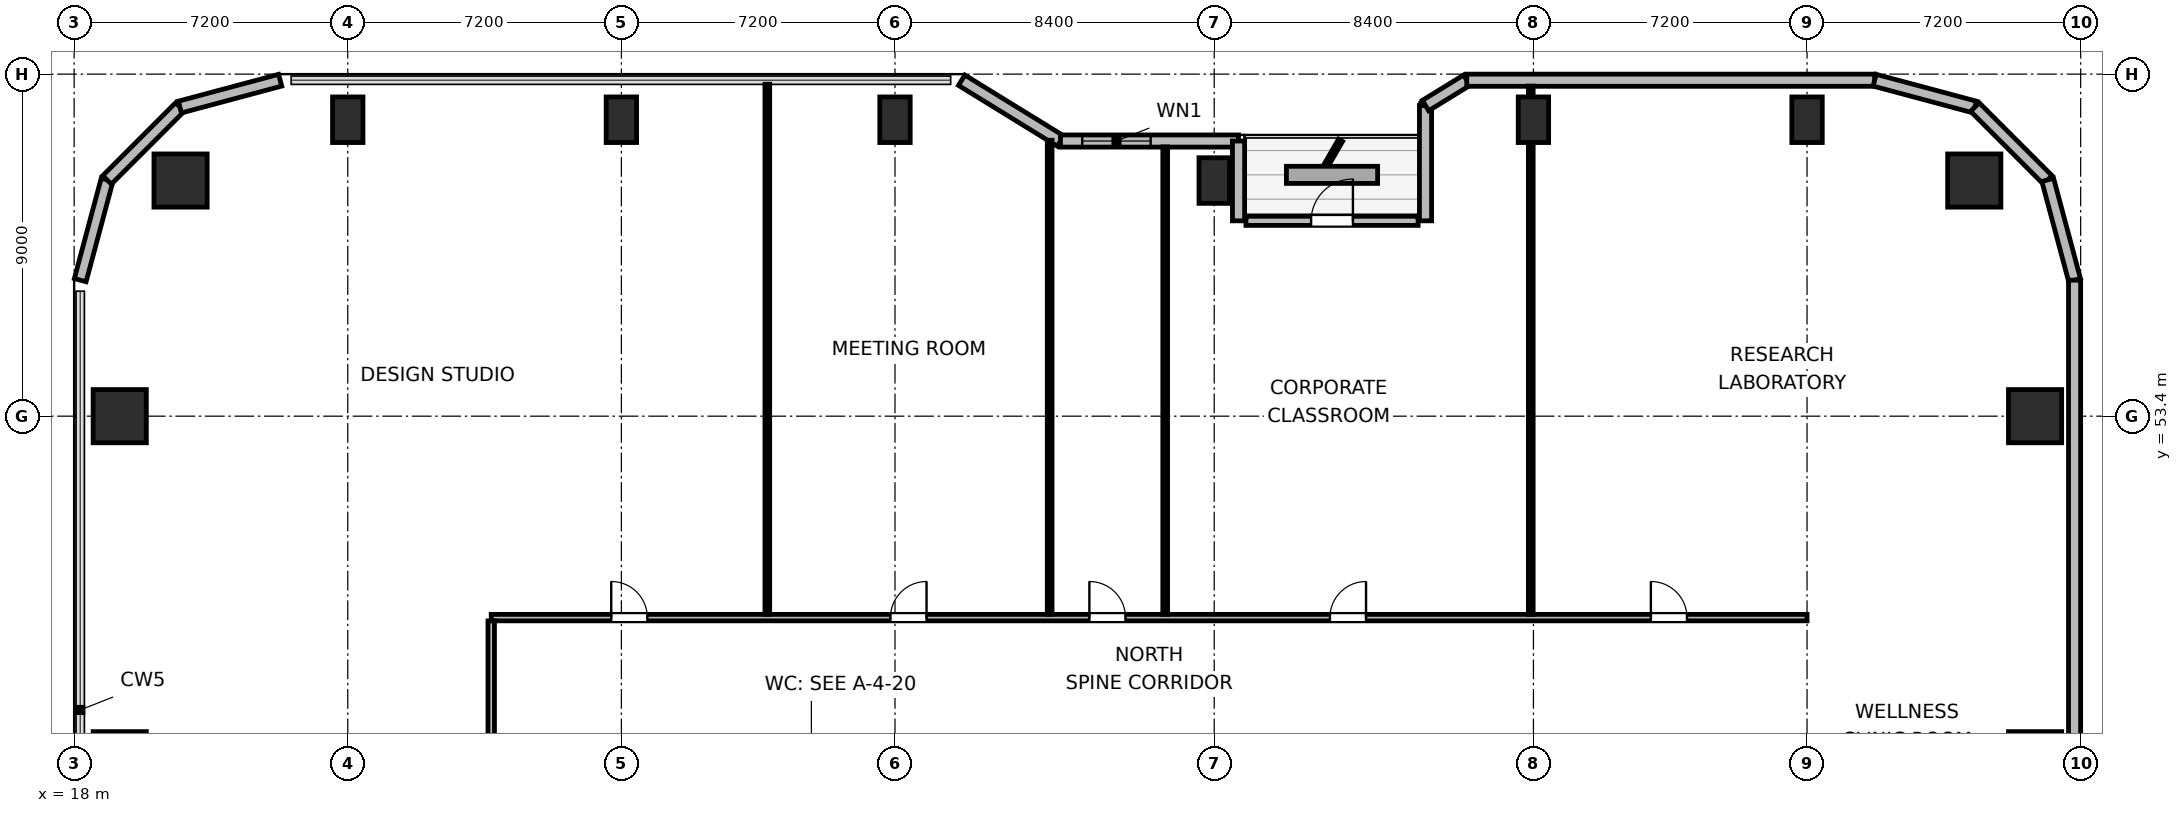
"""IFC4 building model, lengths in metres.
Left out: names, types, materials, properties, quantities, classifications, styles, units other than length and angle.
Written with IfcOpenShell. Run it as: python <this file> out.ifc"""

import sys

from ifc_helpers import new_model, si_unit, direction, frame, frame_2d, origin, origin_2d, place, context, subcontext, project, spatial, rectangle, circle, extrude, element, fill, save


model = new_model("IFC4")
c1 = context("Model", 3, precision=1e-05, world=origin(), true_north=direction((0.0, 1.0)))
c2 = subcontext(c1, "Body", "Model", "MODEL_VIEW")
j1 = project(units=[si_unit("LENGTHUNIT", "METRE"), si_unit("PLANEANGLEUNIT", "RADIAN")], contexts=[c1])
p1 = place(None, origin())
s1 = spatial("IfcSite", under=j1, at=p1, CompositionType="ELEMENT")
p2 = place(p1, origin())
s2 = spatial("IfcBuilding", under=s1, at=p2, CompositionType="ELEMENT")
p3 = place(p2, frame((0.0, 0.0, 125.4)))
s3 = spatial("IfcBuildingStorey", under=s2, at=p3, CompositionType="ELEMENT", Elevation=125.4)
for number, where, z_axis, x_axis in (
    (1, (68.0, 59.6, 0.0), (0.0, 0.0, 1.0), (1.0, 0.0, 0.0)),
    (2, (20.8, 59.6, 0.0), (0.0, 0.0, 1.0), (1.0, 0.0, 0.0)),
):
    element("IfcColumn", number, at=place(p3, frame(where, z_axis=z_axis, x_axis=x_axis)), inside=s3, PredefinedType="COLUMN", context=c2, shape_type="SweptSolid", body=[
        extrude(circle(Radius=0.7, at=origin_2d()), origin(), (0.0, 0.0, 1.0), 4.5),
    ])
for number, where, z_axis, x_axis in (
    (3, (25.2, 61.2, 0.0), (0.0, 0.0, 1.0), (1.0, 0.0, 0.0)),
    (4, (32.4, 61.2, 0.0), (0.0, 0.0, 1.0), (1.0, 0.0, 0.0)),
    (5, (39.6, 61.2, 0.0), (0.0, 0.0, 1.0), (1.0, 0.0, 0.0)),
    (6, (48.0, 59.6, 0.0), (0.0, 0.0, 1.0), (1.0, 0.0, 0.0)),
    (7, (56.4, 61.2, 0.0), (0.0, 0.0, 1.0), (1.0, 0.0, 0.0)),
    (8, (63.6, 61.2, 0.0), (0.0, 0.0, 1.0), (1.0, 0.0, 0.0)),
):
    element("IfcColumn", number, at=place(p3, frame(where, z_axis=z_axis, x_axis=x_axis)), inside=s3, PredefinedType="COLUMN", context=c2, shape_type="SweptSolid", body=[
        extrude(rectangle(XDim=0.8, YDim=1.2, at=origin_2d()), origin(), (0.0, 0.0, 1.0), 4.5),
    ])
for number, where, z_axis, x_axis in (
    (9, (19.2, 44.4, 0.0), (0.0, 0.0, 1.0), (1.0, 0.0, 0.0)),
    (10, (69.6, 44.4, 0.0), (0.0, 0.0, 1.0), (1.0, 0.0, 0.0)),
    (11, (19.2, 53.4, 0.0), (0.0, 0.0, 1.0), (1.0, 0.0, 0.0)),
    (12, (69.6, 53.4, 0.0), (0.0, 0.0, 1.0), (1.0, 0.0, 0.0)),
):
    element("IfcColumn", number, at=place(p3, frame(where, z_axis=z_axis, x_axis=x_axis)), inside=s3, PredefinedType="COLUMN", context=c2, shape_type="SweptSolid", body=[
        extrude(rectangle(XDim=1.4, YDim=1.4, at=origin_2d()), origin(), (0.0, 0.0, 1.0), 4.5),
    ])
p4 = place(p3, frame((18.16, 56.979, 0.0), z_axis=(0.0, 0.0, 1.0), x_axis=(0.25869736047, 0.965958423373, 0.0)))
e13 = element("IfcWall", 13, at=p4, inside=s3, PredefinedType="SOLIDWALL", context=c2, shape_type="SweptSolid", body=[
    extrude(rectangle(XDim=2.731, YDim=0.32, at=frame_2d((1.366, 0.0))), origin(), (0.0, 0.0, 1.0), 4.24),
])
p5 = place(p3, frame((18.866, 59.617, 0.0), z_axis=(0.0, 0.0, 1.0), x_axis=(0.707106781187, 0.707106781187, 0.0)))
e14 = element("IfcWall", 14, at=p5, inside=s3, PredefinedType="SOLIDWALL", context=c2, shape_type="SweptSolid", body=[
    extrude(rectangle(XDim=2.71, YDim=0.32, at=frame_2d((1.355, 0.0))), origin(), (0.0, 0.0, 1.0), 4.24),
])
p6 = place(p3, frame((20.783, 61.533, 0.0), z_axis=(0.0, 0.0, 1.0), x_axis=(0.965964405026, 0.25867502435, 0.0)))
e15 = element("IfcWall", 15, at=p6, inside=s3, PredefinedType="SOLIDWALL", context=c2, shape_type="SweptSolid", body=[
    extrude(rectangle(XDim=2.731, YDim=0.32, at=frame_2d((1.366, 0.0))), origin(), (0.0, 0.0, 1.0), 4.24),
])
p7 = place(p3, frame((41.355, 62.24, 0.0), z_axis=(0.0, 0.0, 1.0), x_axis=(0.851630857047, -0.524142044989, 0.0)))
e16 = element("IfcWall", 16, at=p7, inside=s3, PredefinedType="SOLIDWALL", context=c2, shape_type="SweptSolid", body=[
    extrude(rectangle(XDim=3.053, YDim=0.32, at=frame_2d((1.526, 0.0))), origin(), (0.0, 0.0, 1.0), 3.475),
])
p8 = place(p3, frame((43.955, 60.64, 0.0), z_axis=(0.0, 0.0, 1.0), x_axis=(1.0, 0.0, 0.0)))
e17 = element("IfcWall", 17, at=p8, inside=s3, PredefinedType="SOLIDWALL", context=c2, shape_type="SweptSolid", body=[
    extrude(rectangle(XDim=4.685, YDim=0.32, at=frame_2d((2.343, 0.0))), origin(), (0.0, 0.0, 1.0), 3.475),
])
p9 = place(p8, frame((0.573, 0.0, 0.85)))
e18 = element("IfcOpeningElement", 18, at=p9, cuts=e17, PredefinedType="OPENING", context=c2, shape_type="SweptSolid", body=[
    extrude(rectangle(XDim=1.8, YDim=1.1, at=frame_2d((0.9, 0.55))), frame((0.0, 0.17, 0.0), z_axis=(0.0, -1.0, 0.0), x_axis=(1.0, 0.0, 0.0)), (0.0, 0.0, 1.0), 0.34),
])
p10 = place(p3, frame((48.64, 60.64, 0.0), z_axis=(0.0, 0.0, 1.0), x_axis=(0.0, -1.0, 0.0)))
e19 = element("IfcWall", 19, at=p10, inside=s3, PredefinedType="SOLIDWALL", context=c2, shape_type="SweptSolid", body=[
    extrude(rectangle(XDim=2.1, YDim=0.32, at=frame_2d((1.05, 0.0))), origin(), (0.0, 0.0, 1.0), 3.475),
])
p11 = place(p3, frame((48.835, 58.54, 0.0), z_axis=(0.0, 0.0, 1.0), x_axis=(1.0, 0.0, 0.0)))
e20 = element("IfcWall", 20, at=p11, inside=s3, PredefinedType="SOLIDWALL", context=c2, shape_type="SweptSolid", body=[
    extrude(rectangle(XDim=4.53, YDim=0.24, at=frame_2d((2.265, 0.0))), origin(), (0.0, 0.0, 1.0), 4.24),
])
p12 = place(p11, frame((1.715, 0.0, 0.0)))
e21 = element("IfcOpeningElement", 21, at=p12, cuts=e20, PredefinedType="OPENING", context=c2, shape_type="SweptSolid", body=[
    extrude(rectangle(XDim=1.1, YDim=2.04, at=frame_2d((0.55, 1.02))), frame((0.0, 0.13, 0.0), z_axis=(0.0, -1.0, 0.0), x_axis=(1.0, 0.0, 0.0)), (0.0, 0.0, 1.0), 0.26),
])
p13 = place(p3, frame((53.56, 58.54, 0.0), z_axis=(0.0, 0.0, 1.0), x_axis=(0.0, 1.0, 0.0)))
e22 = element("IfcWall", 22, at=p13, inside=s3, PredefinedType="SOLIDWALL", context=c2, shape_type="SweptSolid", body=[
    extrude(rectangle(XDim=3.032, YDim=0.32, at=frame_2d((1.516, 0.0))), origin(), (0.0, 0.0, 1.0), 3.475),
])
p14 = place(p3, frame((53.56, 61.573, 0.0), z_axis=(0.0, 0.0, 1.0), x_axis=(0.851776724646, 0.523904964045, 0.0)))
e23 = element("IfcWall", 23, at=p14, inside=s3, PredefinedType="SOLIDWALL", context=c2, shape_type="SweptSolid", body=[
    extrude(rectangle(XDim=1.274, YDim=0.32, at=frame_2d((0.637, 0.0))), origin(), (0.0, 0.0, 1.0), 4.24),
])
p15 = place(p3, frame((54.645, 62.24, 0.0), z_axis=(0.0, 0.0, 1.0), x_axis=(1.0, 0.0, 0.0)))
e24 = element("IfcWall", 24, at=p15, inside=s3, PredefinedType="SOLIDWALL", context=c2, shape_type="SweptSolid", body=[
    extrude(rectangle(XDim=10.734, YDim=0.32, at=frame_2d((5.367, 0.0))), origin(), (0.0, 0.0, 1.0), 4.24),
])
p16 = place(p3, frame((65.379, 62.24, 0.0), z_axis=(0.0, 0.0, 1.0), x_axis=(0.965958423373, -0.25869736047, 0.0)))
e25 = element("IfcWall", 25, at=p16, inside=s3, PredefinedType="SOLIDWALL", context=c2, shape_type="SweptSolid", body=[
    extrude(rectangle(XDim=2.731, YDim=0.32, at=frame_2d((1.366, 0.0))), origin(), (0.0, 0.0, 1.0), 4.24),
])
p17 = place(p3, frame((68.017, 61.533, 0.0), z_axis=(0.0, 0.0, 1.0), x_axis=(0.707151821269, -0.707061738235, 0.0)))
e26 = element("IfcWall", 26, at=p17, inside=s3, PredefinedType="SOLIDWALL", context=c2, shape_type="SweptSolid", body=[
    extrude(rectangle(XDim=2.71, YDim=0.32, at=frame_2d((1.355, 0.0))), origin(), (0.0, 0.0, 1.0), 4.24),
])
p18 = place(p3, frame((69.934, 59.617, 0.0), z_axis=(0.0, 0.0, 1.0), x_axis=(0.258613949072, -0.965980758269, 0.0)))
e27 = element("IfcWall", 27, at=p18, inside=s3, PredefinedType="SOLIDWALL", context=c2, shape_type="SweptSolid", body=[
    extrude(rectangle(XDim=2.731, YDim=0.32, at=frame_2d((1.366, 0.0))), origin(), (0.0, 0.0, 1.0), 4.24),
])
p19 = place(p3, frame((70.64, 56.979, 0.0), z_axis=(0.0, 0.0, 1.0), x_axis=(0.0, -1.0, 0.0)))
e28 = element("IfcWall", 28, at=p19, inside=s3, PredefinedType="SOLIDWALL", context=c2, shape_type="SweptSolid", body=[
    extrude(rectangle(XDim=14.219, YDim=0.32, at=frame_2d((7.109, 0.0))), origin(), (0.0, 0.0, 1.0), 4.24),
])
p20 = place(p3, frame((28.975, 48.1, 0.0), z_axis=(0.0, 0.0, 1.0), x_axis=(1.0, 0.0, 0.0)))
e29 = element("IfcWall", 29, at=p20, inside=s3, PredefinedType="PARTITIONING", context=c2, shape_type="SweptSolid", body=[
    extrude(rectangle(XDim=34.625, YDim=0.17, at=frame_2d((17.312, 0.0))), origin(), (0.0, 0.0, 1.0), 4.24),
])
p21 = place(p20, frame((3.158, 0.0, 0.0)))
e30 = element("IfcOpeningElement", 30, at=p21, cuts=e29, PredefinedType="OPENING", context=c2, shape_type="SweptSolid", body=[
    extrude(rectangle(XDim=0.95, YDim=2.04, at=frame_2d((0.475, 1.02))), frame((0.0, 0.095, 0.0), z_axis=(0.0, -1.0, 0.0), x_axis=(1.0, 0.0, 0.0)), (0.0, 0.0, 1.0), 0.19),
])
p22 = place(p20, frame((10.505, 0.0, 0.0)))
e31 = element("IfcOpeningElement", 31, at=p22, cuts=e29, PredefinedType="OPENING", context=c2, shape_type="SweptSolid", body=[
    extrude(rectangle(XDim=0.95, YDim=2.04, at=frame_2d((0.475, 1.02))), frame((0.0, 0.095, 0.0), z_axis=(0.0, -1.0, 0.0), x_axis=(1.0, 0.0, 0.0)), (0.0, 0.0, 1.0), 0.19),
])
p23 = place(p20, frame((15.74, 0.0, 0.0)))
e32 = element("IfcOpeningElement", 32, at=p23, cuts=e29, PredefinedType="OPENING", context=c2, shape_type="SweptSolid", body=[
    extrude(rectangle(XDim=0.95, YDim=2.04, at=frame_2d((0.475, 1.02))), frame((0.0, 0.095, 0.0), z_axis=(0.0, -1.0, 0.0), x_axis=(1.0, 0.0, 0.0)), (0.0, 0.0, 1.0), 0.19),
])
p24 = place(p20, frame((22.07, 0.0, 0.0)))
e33 = element("IfcOpeningElement", 33, at=p24, cuts=e29, PredefinedType="OPENING", context=c2, shape_type="SweptSolid", body=[
    extrude(rectangle(XDim=0.95, YDim=2.04, at=frame_2d((0.475, 1.02))), frame((0.0, 0.095, 0.0), z_axis=(0.0, -1.0, 0.0), x_axis=(1.0, 0.0, 0.0)), (0.0, 0.0, 1.0), 0.19),
])
p25 = place(p20, frame((30.515, 0.0, 0.0)))
e34 = element("IfcOpeningElement", 34, at=p25, cuts=e29, PredefinedType="OPENING", context=c2, shape_type="SweptSolid", body=[
    extrude(rectangle(XDim=0.95, YDim=2.04, at=frame_2d((0.475, 1.02))), frame((0.0, 0.095, 0.0), z_axis=(0.0, -1.0, 0.0), x_axis=(1.0, 0.0, 0.0)), (0.0, 0.0, 1.0), 0.19),
])
p26 = place(p3, frame((28.975, 37.1, 0.0), z_axis=(0.0, 0.0, 1.0), x_axis=(0.0, 1.0, 0.0)))
e35 = element("IfcWall", 35, at=p26, inside=s3, PredefinedType="PARTITIONING", context=c2, shape_type="SweptSolid", body=[
    extrude(rectangle(XDim=10.913, YDim=0.17, at=frame_2d((5.457, 0.0))), origin(), (0.0, 0.0, 1.0), 4.24),
])
p27 = place(p26, frame((5.025, 0.0, 0.0)))
e36 = element("IfcOpeningElement", 36, at=p27, cuts=e35, PredefinedType="OPENING", context=c2, shape_type="SweptSolid", body=[
    extrude(rectangle(XDim=0.95, YDim=2.04, at=frame_2d((0.475, 1.02))), frame((0.0, 0.095, 0.0), z_axis=(0.0, -1.0, 0.0), x_axis=(1.0, 0.0, 0.0)), (0.0, 0.0, 1.0), 0.19),
])
p28 = place(p3, frame((36.24, 48.187, 0.0), z_axis=(0.0, 0.0, 1.0), x_axis=(0.0, 1.0, 0.0)))
e37 = element("IfcWall", 37, at=p28, inside=s3, PredefinedType="PARTITIONING", context=c2, shape_type="SweptSolid", body=[
    extrude(rectangle(XDim=13.948, YDim=0.125, at=frame_2d((6.974, 0.0))), origin(), (0.0, 0.0, 1.0), 4.24),
])
p29 = place(p3, frame((43.67, 48.187, 0.0), z_axis=(0.0, 0.0, 1.0), x_axis=(0.0, 1.0, 0.0)))
e38 = element("IfcWall", 38, at=p29, inside=s3, PredefinedType="PARTITIONING", context=c2, shape_type="SweptSolid", body=[
    extrude(rectangle(XDim=12.473, YDim=0.125, at=frame_2d((6.236, 0.0))), origin(), (0.0, 0.0, 1.0), 3.603),
])
p30 = place(p3, frame((46.71, 48.187, 0.0), z_axis=(0.0, 0.0, 1.0), x_axis=(0.0, 1.0, 0.0)))
e39 = element("IfcWall", 39, at=p30, inside=s3, PredefinedType="PARTITIONING", context=c2, shape_type="SweptSolid", body=[
    extrude(rectangle(XDim=12.298, YDim=0.125, at=frame_2d((6.149, 0.0))), origin(), (0.0, 0.0, 1.0), 4.24),
])
p31 = place(p3, frame((56.33, 48.187, 0.0), z_axis=(0.0, 0.0, 1.0), x_axis=(0.0, 1.0, 0.0)))
e40 = element("IfcWall", 40, at=p31, inside=s3, PredefinedType="PARTITIONING", context=c2, shape_type="SweptSolid", body=[
    extrude(rectangle(XDim=13.898, YDim=0.125, at=frame_2d((6.949, 0.0))), origin(), (0.0, 0.0, 1.0), 3.603),
])
p32 = place(p9, origin())
e41 = element("IfcWindow", 41, at=p32, inside=s3, PartitioningType="SINGLE_PANEL", PredefinedType="WINDOW", context=c2, shape_type="SweptSolid", body=[
    extrude(rectangle(XDim=1.8, YDim=1.1, at=frame_2d((0.9, 0.55))), frame((0.0, 0.03, 0.0), z_axis=(0.0, -1.0, 0.0), x_axis=(1.0, 0.0, 0.0)), (0.0, 0.0, 1.0), 0.06),
])
fill(e18, e41)
p33 = place(p12, origin())
e42 = element("IfcDoor", 42, at=p33, inside=s3, OperationType="SINGLE_SWING_RIGHT", PredefinedType="DOOR", context=c2, shape_type="SweptSolid", body=[
    extrude(rectangle(XDim=1.1, YDim=2.04, at=frame_2d((0.55, 1.02))), frame((0.0, 0.025, 0.0), z_axis=(0.0, -1.0, 0.0), x_axis=(1.0, 0.0, 0.0)), (0.0, 0.0, 1.0), 0.05),
])
fill(e21, e42)
p34 = place(p21, origin())
e43 = element("IfcDoor", 43, at=p34, inside=s3, OperationType="SINGLE_SWING_LEFT", PredefinedType="DOOR", context=c2, shape_type="SweptSolid", body=[
    extrude(rectangle(XDim=0.95, YDim=2.04, at=frame_2d((0.475, 1.02))), frame((0.0, 0.025, 0.0), z_axis=(0.0, -1.0, 0.0), x_axis=(1.0, 0.0, 0.0)), (0.0, 0.0, 1.0), 0.05),
])
fill(e30, e43)
p35 = place(p22, origin())
e44 = element("IfcDoor", 44, at=p35, inside=s3, OperationType="SINGLE_SWING_RIGHT", PredefinedType="DOOR", context=c2, shape_type="SweptSolid", body=[
    extrude(rectangle(XDim=0.95, YDim=2.04, at=frame_2d((0.475, 1.02))), frame((0.0, 0.025, 0.0), z_axis=(0.0, -1.0, 0.0), x_axis=(1.0, 0.0, 0.0)), (0.0, 0.0, 1.0), 0.05),
])
fill(e31, e44)
p36 = place(p23, origin())
e45 = element("IfcDoor", 45, at=p36, inside=s3, OperationType="SINGLE_SWING_LEFT", PredefinedType="DOOR", context=c2, shape_type="SweptSolid", body=[
    extrude(rectangle(XDim=0.95, YDim=2.04, at=frame_2d((0.475, 1.02))), frame((0.0, 0.025, 0.0), z_axis=(0.0, -1.0, 0.0), x_axis=(1.0, 0.0, 0.0)), (0.0, 0.0, 1.0), 0.05),
])
fill(e32, e45)
p37 = place(p24, origin())
e46 = element("IfcDoor", 46, at=p37, inside=s3, OperationType="SINGLE_SWING_RIGHT", PredefinedType="DOOR", context=c2, shape_type="SweptSolid", body=[
    extrude(rectangle(XDim=0.95, YDim=2.04, at=frame_2d((0.475, 1.02))), frame((0.0, 0.025, 0.0), z_axis=(0.0, -1.0, 0.0), x_axis=(1.0, 0.0, 0.0)), (0.0, 0.0, 1.0), 0.05),
])
fill(e33, e46)
p38 = place(p25, origin())
e47 = element("IfcDoor", 47, at=p38, inside=s3, OperationType="SINGLE_SWING_LEFT", PredefinedType="DOOR", context=c2, shape_type="SweptSolid", body=[
    extrude(rectangle(XDim=0.95, YDim=2.04, at=frame_2d((0.475, 1.02))), frame((0.0, 0.025, 0.0), z_axis=(0.0, -1.0, 0.0), x_axis=(1.0, 0.0, 0.0)), (0.0, 0.0, 1.0), 0.05),
])
fill(e34, e47)
save(model, sys.argv[1])
